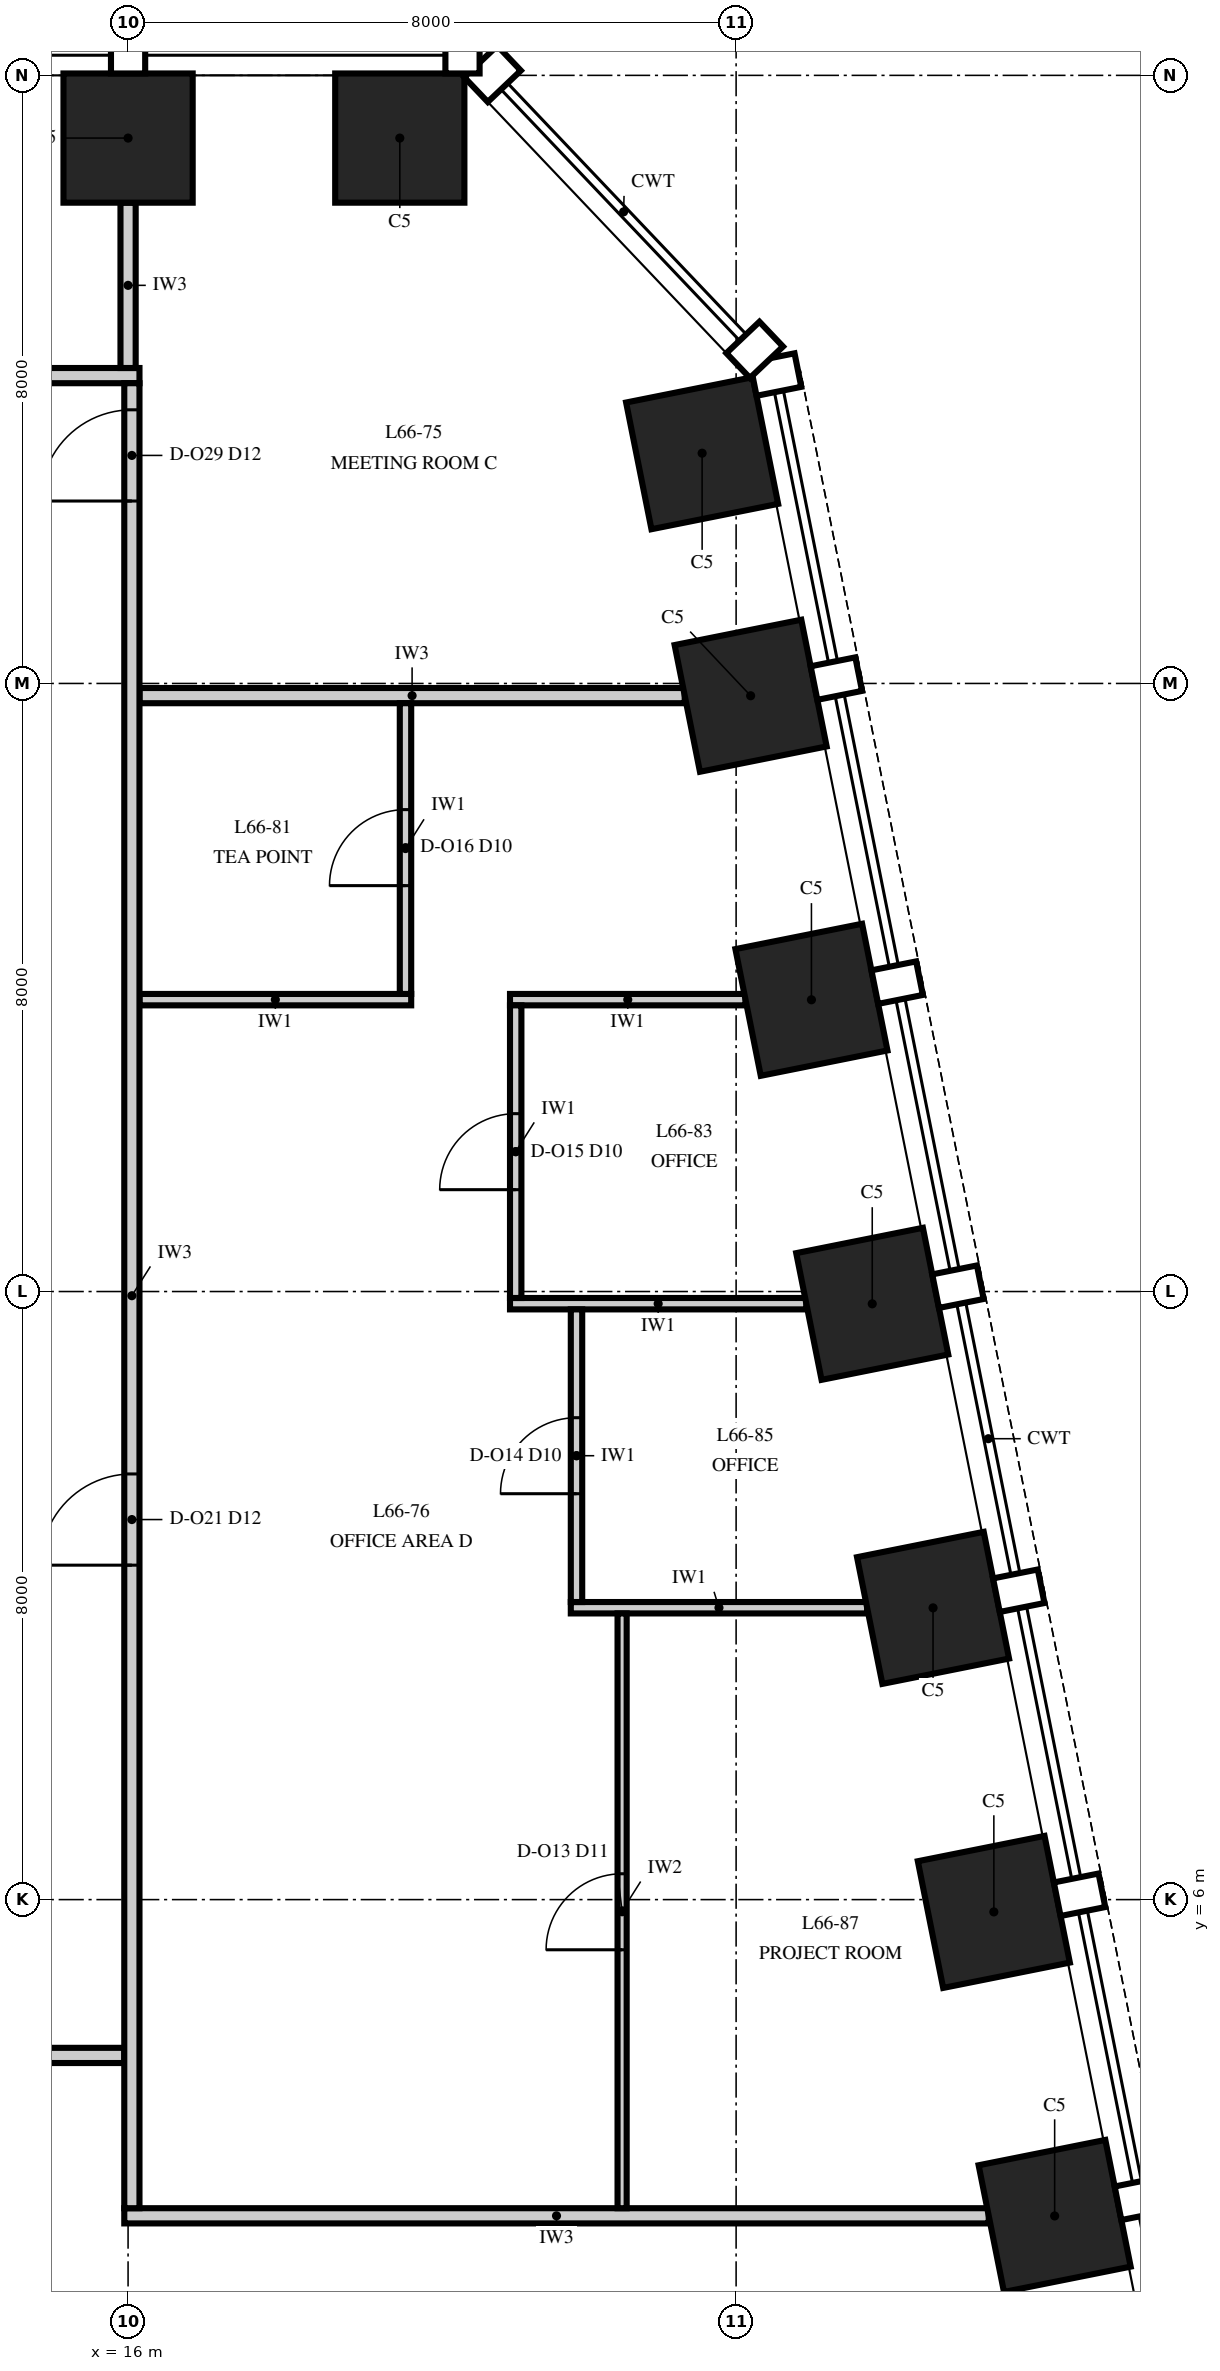
"""IFC4 building model, lengths in metres.
Left out: names, types, materials, properties, quantities, classifications, styles, units other than length and angle.
Written with IfcOpenShell. Run it as: python <this file> out.ifc"""

import sys

from ifc_helpers import new_model, si_unit, direction, frame, frame_2d, origin, origin_2d, place, context, subcontext, project, spatial, rectangle, extrude, element, fill, save


model = new_model("IFC4")
c1 = context("Model", 3, precision=1e-05, world=origin(), true_north=direction((0.0, 1.0)))
c2 = subcontext(c1, "Body", "Model", "MODEL_VIEW")
j1 = project(units=[si_unit("LENGTHUNIT", "METRE"), si_unit("PLANEANGLEUNIT", "RADIAN")], contexts=[c1])
p1 = place(None, origin())
s1 = spatial("IfcSite", under=j1, at=p1, CompositionType="ELEMENT")
p2 = place(p1, origin())
s2 = spatial("IfcBuilding", under=s1, at=p2, CompositionType="ELEMENT")
p3 = place(p2, frame((0.0, 0.0, 284.0)))
s3 = spatial("IfcBuildingStorey", under=s2, at=p3, CompositionType="ELEMENT", Elevation=284.0)
for number, where, z_axis, x_axis in (
    (1, (28.191, 1.838, 0.0), (0.0, 0.0, 1.0), (-0.196, 0.981, 0.0)),
    (2, (27.391, 5.838, 0.0), (0.0, 0.0, 1.0), (-0.196, 0.981, 0.0)),
    (3, (26.591, 9.838, 0.0), (0.0, 0.0, 1.0), (-0.196, 0.981, 0.0)),
    (4, (25.791, 13.838, 0.0), (0.0, 0.0, 1.0), (-0.196, 0.981, 0.0)),
    (5, (24.991, 17.838, 0.0), (0.0, 0.0, 1.0), (-0.196, 0.981, 0.0)),
    (6, (24.191, 21.838, 0.0), (0.0, 0.0, 1.0), (-0.196, 0.981, 0.0)),
    (7, (23.553, 25.029, 0.0), (0.0, 0.0, 1.0), (-0.196, 0.981, 0.0)),
    (8, (19.575, 29.175, 0.0), (0.0, 0.0, 1.0), (-1.0, 0.0, 0.0)),
    (9, (16.0, 29.175, 0.0), (0.0, 0.0, 1.0), (-1.0, 0.0, 0.0)),
):
    element("IfcColumn", number, at=place(p3, frame(where, z_axis=z_axis, x_axis=x_axis)), inside=s3, PredefinedType="COLUMN", context=c2, shape_type="SweptSolid", body=[
        extrude(rectangle(XDim=1.7, YDim=1.7, at=origin_2d()), origin(), (0.0, 0.0, 1.0), 4.0),
    ])
p4 = place(p3, frame((15.95, 1.84, 0.0), z_axis=(0.0, 0.0, 1.0), x_axis=(1.0, 0.0, 0.0)))
e10 = element("IfcWall", 10, at=p4, inside=s3, PredefinedType="PARTITIONING", context=c2, shape_type="SweptSolid", body=[
    extrude(rectangle(XDim=11.374, YDim=0.2, at=frame_2d((5.687, 0.0))), origin(), (0.0, 0.0, 1.0), 3.23),
])
p5 = place(p3, frame((1.9, 3.95, 0.0), z_axis=(0.0, 0.0, 1.0), x_axis=(1.0, 0.0, 0.0)))
e11 = element("IfcWall", 11, at=p5, inside=s3, PredefinedType="PARTITIONING", context=c2, shape_type="SweptSolid", body=[
    extrude(rectangle(XDim=14.05, YDim=0.2, at=frame_2d((7.025, 0.0))), origin(), (0.0, 0.0, 1.0), 3.23),
])
p6 = place(p5, frame((3.5, 0.0, 0.0)))
e12 = element("IfcOpeningElement", 12, at=p6, cuts=e11, PredefinedType="OPENING", context=c2, shape_type="SweptSolid", body=[
    extrude(rectangle(XDim=1.2, YDim=2.4, at=frame_2d((0.6, 1.2))), frame((0.0, 0.115, 0.0), z_axis=(0.0, -1.0, 0.0), x_axis=(1.0, 0.0, 0.0)), (0.0, 0.0, 1.0), 0.23),
])
for number, where, z_axis, x_axis in (
    (13, (21.825, 9.84, 0.0), (0.0, 0.0, 1.0), (1.0, 0.0, 0.0)),
    (14, (21.025, 13.84, 0.0), (0.0, 0.0, 1.0), (1.0, 0.0, 0.0)),
):
    element("IfcWall", number, at=place(p3, frame(where, z_axis=z_axis, x_axis=x_axis)), inside=s3, PredefinedType="PARTITIONING", context=c2, shape_type="SweptSolid", body=[
        extrude(rectangle(XDim=3.899, YDim=0.15, at=frame_2d((1.949, 0.0))), origin(), (0.0, 0.0, 1.0), 3.23),
    ])
p7 = place(p3, frame((16.15, 17.84, 0.0), z_axis=(0.0, 0.0, 1.0), x_axis=(1.0, 0.0, 0.0)))
e15 = element("IfcWall", 15, at=p7, inside=s3, PredefinedType="PARTITIONING", context=c2, shape_type="SweptSolid", body=[
    extrude(rectangle(XDim=3.575, YDim=0.15, at=frame_2d((1.788, 0.0))), origin(), (0.0, 0.0, 1.0), 3.23),
])
p8 = place(p3, frame((21.025, 17.84, 0.0), z_axis=(0.0, 0.0, 1.0), x_axis=(1.0, 0.0, 0.0)))
e16 = element("IfcWall", 16, at=p8, inside=s3, PredefinedType="PARTITIONING", context=c2, shape_type="SweptSolid", body=[
    extrude(rectangle(XDim=3.099, YDim=0.15, at=frame_2d((1.549, 0.0))), origin(), (0.0, 0.0, 1.0), 3.23),
])
p9 = place(p3, frame((16.15, 21.84, 0.0), z_axis=(0.0, 0.0, 1.0), x_axis=(1.0, 0.0, 0.0)))
e17 = element("IfcWall", 17, at=p9, inside=s3, PredefinedType="PARTITIONING", context=c2, shape_type="SweptSolid", body=[
    extrude(rectangle(XDim=7.174, YDim=0.2, at=frame_2d((3.587, 0.0))), origin(), (0.0, 0.0, 1.0), 3.23),
])
p10 = place(p3, frame((-16.15, 26.05, 0.0), z_axis=(0.0, 0.0, 1.0), x_axis=(1.0, 0.0, 0.0)))
e18 = element("IfcWall", 18, at=p10, inside=s3, PredefinedType="PARTITIONING", context=c2, shape_type="SweptSolid", body=[
    extrude(rectangle(XDim=32.3, YDim=0.2, at=frame_2d((16.15, 0.0))), origin(), (0.0, 0.0, 1.0), 3.418),
])
p11 = place(p10, frame((1.55, 0.0, 0.0)))
e19 = element("IfcOpeningElement", 19, at=p11, cuts=e18, PredefinedType="OPENING", context=c2, shape_type="SweptSolid", body=[
    extrude(rectangle(XDim=1.2, YDim=2.4, at=frame_2d((0.6, 1.2))), frame((0.0, 0.115, 0.0), z_axis=(0.0, -1.0, 0.0), x_axis=(1.0, 0.0, 0.0)), (0.0, 0.0, 1.0), 0.23),
])
p12 = place(p10, frame((7.55, 0.0, 0.0)))
e20 = element("IfcOpeningElement", 20, at=p12, cuts=e18, PredefinedType="OPENING", context=c2, shape_type="SweptSolid", body=[
    extrude(rectangle(XDim=1.2, YDim=2.4, at=frame_2d((0.6, 1.2))), frame((0.0, 0.115, 0.0), z_axis=(0.0, -1.0, 0.0), x_axis=(1.0, 0.0, 0.0)), (0.0, 0.0, 1.0), 0.23),
])
p13 = place(p10, frame((13.55, 0.0, 0.0)))
e21 = element("IfcOpeningElement", 21, at=p13, cuts=e18, PredefinedType="OPENING", context=c2, shape_type="SweptSolid", body=[
    extrude(rectangle(XDim=1.2, YDim=2.4, at=frame_2d((0.6, 1.2))), frame((0.0, 0.115, 0.0), z_axis=(0.0, -1.0, 0.0), x_axis=(1.0, 0.0, 0.0)), (0.0, 0.0, 1.0), 0.23),
])
p14 = place(p10, frame((17.55, 0.0, 0.0)))
e22 = element("IfcOpeningElement", 22, at=p14, cuts=e18, PredefinedType="OPENING", context=c2, shape_type="SweptSolid", body=[
    extrude(rectangle(XDim=1.2, YDim=2.4, at=frame_2d((0.6, 1.2))), frame((0.0, 0.115, 0.0), z_axis=(0.0, -1.0, 0.0), x_axis=(1.0, 0.0, 0.0)), (0.0, 0.0, 1.0), 0.23),
])
p15 = place(p10, frame((23.55, 0.0, 0.0)))
e23 = element("IfcOpeningElement", 23, at=p15, cuts=e18, PredefinedType="OPENING", context=c2, shape_type="SweptSolid", body=[
    extrude(rectangle(XDim=1.2, YDim=2.4, at=frame_2d((0.6, 1.2))), frame((0.0, 0.115, 0.0), z_axis=(0.0, -1.0, 0.0), x_axis=(1.0, 0.0, 0.0)), (0.0, 0.0, 1.0), 0.23),
])
p16 = place(p10, frame((29.55, 0.0, 0.0)))
e24 = element("IfcOpeningElement", 24, at=p16, cuts=e18, PredefinedType="OPENING", context=c2, shape_type="SweptSolid", body=[
    extrude(rectangle(XDim=1.2, YDim=2.4, at=frame_2d((0.6, 1.2))), frame((0.0, 0.115, 0.0), z_axis=(0.0, -1.0, 0.0), x_axis=(1.0, 0.0, 0.0)), (0.0, 0.0, 1.0), 0.23),
])
p17 = place(p3, frame((16.0, 26.15, 0.0), z_axis=(0.0, 0.0, 1.0), x_axis=(0.0, 1.0, 0.0)))
e25 = element("IfcWall", 25, at=p17, inside=s3, PredefinedType="PARTITIONING", context=c2, shape_type="SweptSolid", body=[
    extrude(rectangle(XDim=2.175, YDim=0.2, at=frame_2d((1.087, 0.0))), origin(), (0.0, 0.0, 1.0), 3.418),
])
p18 = place(p3, frame((16.05, 1.94, 0.0), z_axis=(0.0, 0.0, 1.0), x_axis=(0.0, 1.0, 0.0)))
e26 = element("IfcWall", 26, at=p18, inside=s3, PredefinedType="PARTITIONING", context=c2, shape_type="SweptSolid", body=[
    extrude(rectangle(XDim=24.01, YDim=0.2, at=frame_2d((12.005, 0.0))), origin(), (0.0, 0.0, 1.0), 2.842),
])
p19 = place(p18, frame((8.46, 0.0, 0.0)))
e27 = element("IfcOpeningElement", 27, at=p19, cuts=e26, PredefinedType="OPENING", context=c2, shape_type="SweptSolid", body=[
    extrude(rectangle(XDim=1.2, YDim=2.4, at=frame_2d((0.6, 1.2))), frame((0.0, 0.115, 0.0), z_axis=(0.0, -1.0, 0.0), x_axis=(1.0, 0.0, 0.0)), (0.0, 0.0, 1.0), 0.23),
])
p20 = place(p18, frame((22.46, 0.0, 0.0)))
e28 = element("IfcOpeningElement", 28, at=p20, cuts=e26, PredefinedType="OPENING", context=c2, shape_type="SweptSolid", body=[
    extrude(rectangle(XDim=1.2, YDim=2.4, at=frame_2d((0.6, 1.2))), frame((0.0, 0.115, 0.0), z_axis=(0.0, -1.0, 0.0), x_axis=(1.0, 0.0, 0.0)), (0.0, 0.0, 1.0), 0.23),
])
p21 = place(p3, frame((19.65, 17.915, 0.0), z_axis=(0.0, 0.0, 1.0), x_axis=(0.0, 1.0, 0.0)))
e29 = element("IfcWall", 29, at=p21, inside=s3, PredefinedType="PARTITIONING", context=c2, shape_type="SweptSolid", body=[
    extrude(rectangle(XDim=3.825, YDim=0.15, at=frame_2d((1.913, 0.0))), origin(), (0.0, 0.0, 1.0), 3.23),
])
p22 = place(p21, frame((1.425, 0.0, 0.0)))
e30 = element("IfcOpeningElement", 30, at=p22, cuts=e29, PredefinedType="OPENING", context=c2, shape_type="SweptSolid", body=[
    extrude(rectangle(XDim=1.0, YDim=2.3, at=frame_2d((0.5, 1.15))), frame((0.0, 0.09, 0.0), z_axis=(0.0, -1.0, 0.0), x_axis=(1.0, 0.0, 0.0)), (0.0, 0.0, 1.0), 0.18),
])
p23 = place(p3, frame((21.1, 13.915, 0.0), z_axis=(0.0, 0.0, 1.0), x_axis=(0.0, 1.0, 0.0)))
e31 = element("IfcWall", 31, at=p23, inside=s3, PredefinedType="PARTITIONING", context=c2, shape_type="SweptSolid", body=[
    extrude(rectangle(XDim=3.85, YDim=0.15, at=frame_2d((1.925, 0.0))), origin(), (0.0, 0.0, 1.0), 3.23),
])
p24 = place(p23, frame((1.425, 0.0, 0.0)))
e32 = element("IfcOpeningElement", 32, at=p24, cuts=e31, PredefinedType="OPENING", context=c2, shape_type="SweptSolid", body=[
    extrude(rectangle(XDim=1.0, YDim=2.3, at=frame_2d((0.5, 1.15))), frame((0.0, 0.09, 0.0), z_axis=(0.0, -1.0, 0.0), x_axis=(1.0, 0.0, 0.0)), (0.0, 0.0, 1.0), 0.18),
])
p25 = place(p3, frame((21.9, 9.915, 0.0), z_axis=(0.0, 0.0, 1.0), x_axis=(0.0, 1.0, 0.0)))
e33 = element("IfcWall", 33, at=p25, inside=s3, PredefinedType="PARTITIONING", context=c2, shape_type="SweptSolid", body=[
    extrude(rectangle(XDim=3.85, YDim=0.15, at=frame_2d((1.925, 0.0))), origin(), (0.0, 0.0, 1.0), 3.85),
])
p26 = place(p25, frame((1.425, 0.0, 0.0)))
e34 = element("IfcOpeningElement", 34, at=p26, cuts=e33, PredefinedType="OPENING", context=c2, shape_type="SweptSolid", body=[
    extrude(rectangle(XDim=1.0, YDim=2.3, at=frame_2d((0.5, 1.15))), frame((0.0, 0.09, 0.0), z_axis=(0.0, -1.0, 0.0), x_axis=(1.0, 0.0, 0.0)), (0.0, 0.0, 1.0), 0.18),
])
p27 = place(p3, frame((22.5, 1.94, 0.0), z_axis=(0.0, 0.0, 1.0), x_axis=(0.0, 1.0, 0.0)))
e35 = element("IfcWall", 35, at=p27, inside=s3, PredefinedType="PARTITIONING", context=c2, shape_type="SweptSolid", body=[
    extrude(rectangle(XDim=7.825, YDim=0.12, at=frame_2d((3.913, 0.0))), origin(), (0.0, 0.0, 1.0), 2.842),
])
p28 = place(p27, frame((3.4, 0.0, 0.0)))
e36 = element("IfcOpeningElement", 36, at=p28, cuts=e35, PredefinedType="OPENING", context=c2, shape_type="SweptSolid", body=[
    extrude(rectangle(XDim=1.0, YDim=2.4, at=frame_2d((0.5, 1.2))), frame((0.0, 0.075, 0.0), z_axis=(0.0, -1.0, 0.0), x_axis=(1.0, 0.0, 0.0)), (0.0, 0.0, 1.0), 0.15),
])
p29 = place(p28, origin())
e37 = element("IfcDoor", 37, at=p29, inside=s3, OperationType="SINGLE_SWING_RIGHT", PredefinedType="DOOR", context=c2, shape_type="SweptSolid", body=[
    extrude(rectangle(XDim=1.0, YDim=2.4, at=frame_2d((0.5, 1.2))), frame((0.0, 0.06, 0.0), z_axis=(0.0, -1.0, 0.0), x_axis=(1.0, 0.0, 0.0)), (0.0, 0.0, 1.0), 0.12),
])
fill(e36, e37)
p30 = place(p26, origin())
e38 = element("IfcDoor", 38, at=p30, inside=s3, OperationType="SINGLE_SWING_LEFT", PredefinedType="DOOR", context=c2, shape_type="SweptSolid", body=[
    extrude(rectangle(XDim=1.0, YDim=2.3, at=frame_2d((0.5, 1.15))), frame((0.0, 0.075, 0.0), z_axis=(0.0, -1.0, 0.0), x_axis=(1.0, 0.0, 0.0)), (0.0, 0.0, 1.0), 0.149),
])
fill(e34, e38)
p31 = place(p24, origin())
e39 = element("IfcDoor", 39, at=p31, inside=s3, OperationType="SINGLE_SWING_LEFT", PredefinedType="DOOR", context=c2, shape_type="SweptSolid", body=[
    extrude(rectangle(XDim=1.0, YDim=2.3, at=frame_2d((0.5, 1.15))), frame((0.0, 0.075, 0.0), z_axis=(0.0, -1.0, 0.0), x_axis=(1.0, 0.0, 0.0)), (0.0, 0.0, 1.0), 0.149),
])
fill(e32, e39)
p32 = place(p22, origin())
e40 = element("IfcDoor", 40, at=p32, inside=s3, OperationType="SINGLE_SWING_LEFT", PredefinedType="DOOR", context=c2, shape_type="SweptSolid", body=[
    extrude(rectangle(XDim=1.0, YDim=2.3, at=frame_2d((0.5, 1.15))), frame((0.0, 0.075, 0.0), z_axis=(0.0, -1.0, 0.0), x_axis=(1.0, 0.0, 0.0)), (0.0, 0.0, 1.0), 0.149),
])
fill(e30, e40)
p33 = place(p19, origin())
e41 = element("IfcDoor", 41, at=p33, inside=s3, OperationType="SINGLE_SWING_LEFT", PredefinedType="DOOR", context=c2, shape_type="SweptSolid", body=[
    extrude(rectangle(XDim=1.2, YDim=2.4, at=frame_2d((0.6, 1.2))), frame((0.0, 0.1, 0.0), z_axis=(0.0, -1.0, 0.0), x_axis=(1.0, 0.0, 0.0)), (0.0, 0.0, 1.0), 0.199),
])
fill(e27, e41)
p34 = place(p20, origin())
e42 = element("IfcDoor", 42, at=p34, inside=s3, OperationType="SINGLE_SWING_LEFT", PredefinedType="DOOR", context=c2, shape_type="SweptSolid", body=[
    extrude(rectangle(XDim=1.2, YDim=2.4, at=frame_2d((0.6, 1.2))), frame((0.0, 0.1, 0.0), z_axis=(0.0, -1.0, 0.0), x_axis=(1.0, 0.0, 0.0)), (0.0, 0.0, 1.0), 0.199),
])
fill(e28, e42)
save(model, sys.argv[1])
